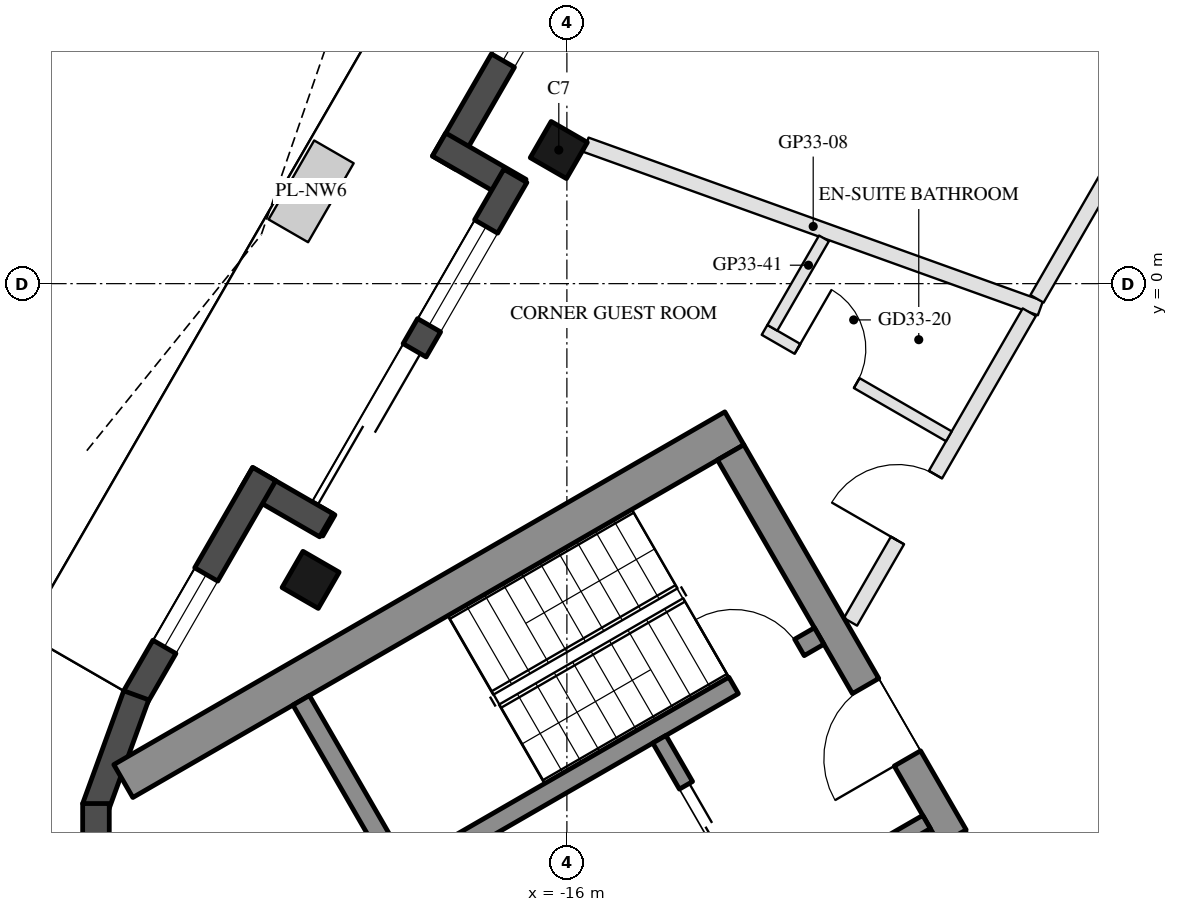
"""IFC4 building model, lengths in metres.
Left out: names, types, materials, properties, quantities, classifications, styles, units other than length and angle.
Written with IfcOpenShell. Run it as: python <this file> out.ifc"""

import sys

from ifc_helpers import new_model, si_unit, direction, frame, frame_2d, origin, origin_2d, place, context, subcontext, project, spatial, rectangle, hollow_rectangle, extrude, boolean, halfspace, element, fill, save


model = new_model("IFC4")
c1 = context("Model", 3, precision=1e-05, world=origin(), true_north=direction((0.0, 1.0)))
c2 = subcontext(c1, "Body", "Model", "MODEL_VIEW")
j1 = project(units=[si_unit("LENGTHUNIT", "METRE"), si_unit("PLANEANGLEUNIT", "RADIAN")], contexts=[c1])
p1 = place(None, origin())
s1 = spatial("IfcSite", under=j1, at=p1, CompositionType="ELEMENT")
p2 = place(p1, origin())
s2 = spatial("IfcBuilding", under=s1, at=p2, CompositionType="ELEMENT")
p3 = place(p2, frame((0.0, 0.0, 313.3)))
s3 = spatial("IfcBuildingStorey", under=s2, at=p3, CompositionType="ELEMENT", Elevation=313.3)
p4 = place(p3, frame((-16.106, 1.758, 0.0), z_axis=(0.0, 0.0, 1.0), x_axis=(0.5, 0.866025403784, 0.0)))
e1 = element("IfcColumn", 1, at=p4, inside=s3, PredefinedType="COLUMN", context=c2, shape_type="SweptSolid", body=[
    boolean("DIFFERENCE", extrude(hollow_rectangle(XDim=0.55, YDim=0.55, WallThickness=0.025, at=origin_2d()), origin(), (0.0, 0.0, 1.0), 3.7), halfspace(frame((0.0, 0.0, 0.034), z_axis=(0.0, 0.0, 1.0), x_axis=(1.0, 0.0, 0.0)), True)),
])
p5 = place(p3, frame((-19.372, -3.898, 0.0), z_axis=(0.0, 0.0, 1.0), x_axis=(0.5, 0.866025403784, 0.0)))
e2 = element("IfcColumn", 2, at=p5, inside=s3, PredefinedType="COLUMN", context=c2, shape_type="SweptSolid", body=[
    boolean("DIFFERENCE", extrude(hollow_rectangle(XDim=0.55, YDim=0.55, WallThickness=0.025, at=origin_2d()), origin(), (0.0, 0.0, 1.0), 3.7), halfspace(frame((0.0, 0.0, 0.04), z_axis=(0.0, 0.0, 1.0), x_axis=(1.0, 0.0, 0.0)), True)),
])
p6 = place(p3, frame((-13.452, 8.806, 0.0), z_axis=(0.0, 0.0, 1.0), x_axis=(-0.499993893925, -0.8660289291, 0.0)))
e3 = element("IfcWall", 3, at=p6, inside=s3, PredefinedType="SOLIDWALL", context=c2, shape_type="SweptSolid", body=[
    extrude(rectangle(XDim=8.331, YDim=0.35, at=frame_2d((4.165, 0.0))), origin(), (0.0, 0.0, 1.0), 3.55),
])
p7 = place(p6, frame((1.525, 0.0, 0.0)))
e4 = element("IfcOpeningElement", 4, at=p7, cuts=e3, PredefinedType="OPENING", context=c2, shape_type="SweptSolid", body=[
    extrude(rectangle(XDim=2.4, YDim=2.4, at=frame_2d((1.2, 1.2))), frame((0.0, 0.185, 0.0), z_axis=(0.0, -1.0, 0.0), x_axis=(1.0, 0.0, 0.0)), (0.0, 0.0, 1.0), 0.37),
])
p8 = place(p6, frame((4.225, 0.0, 0.3)))
e5 = element("IfcOpeningElement", 5, at=p8, cuts=e3, PredefinedType="OPENING", context=c2, shape_type="SweptSolid", body=[
    extrude(rectangle(XDim=0.8, YDim=2.65, at=frame_2d((0.4, 1.325))), frame((0.0, 0.185, 0.0), z_axis=(0.0, -1.0, 0.0), x_axis=(1.0, 0.0, 0.0)), (0.0, 0.0, 1.0), 0.37),
])
p9 = place(p6, frame((5.779, 0.0, 0.3)))
e6 = element("IfcOpeningElement", 6, at=p9, cuts=e3, PredefinedType="OPENING", context=c2, shape_type="SweptSolid", body=[
    extrude(rectangle(XDim=1.0, YDim=2.65, at=frame_2d((0.5, 1.325))), frame((0.0, 0.185, 0.0), z_axis=(0.0, -1.0, 0.0), x_axis=(1.0, 0.0, 0.0)), (0.0, 0.0, 1.0), 0.37),
])
p10 = place(p3, frame((-17.681, 1.83, 0.0), z_axis=(0.0, 0.0, 1.0), x_axis=(0.866092288191, -0.499884134912, 0.0)))
e7 = element("IfcWall", 7, at=p10, inside=s3, PredefinedType="SOLIDWALL", context=c2, shape_type="SweptSolid", body=[
    extrude(rectangle(XDim=1.22, YDim=0.35, at=frame_2d((0.61, 0.0))), origin(), (0.0, 0.0, 1.0), 3.55),
])
p11 = place(p3, frame((-16.678, 1.418, 0.0), z_axis=(0.0, 0.0, 1.0), x_axis=(-0.499996591357, -0.866027371756, 0.0)))
e8 = element("IfcWall", 8, at=p11, inside=s3, PredefinedType="SOLIDWALL", context=c2, shape_type="SweptSolid", body=[
    extrude(rectangle(XDim=5.371, YDim=0.35, at=frame_2d((2.685, 0.0))), origin(), (0.0, 0.0, 1.0), 3.55),
])
p12 = place(p11, frame((2.651, 0.0, 0.0)))
e9 = element("IfcOpeningElement", 9, at=p12, cuts=e8, PredefinedType="OPENING", context=c2, shape_type="SweptSolid", body=[
    extrude(rectangle(XDim=2.4, YDim=2.4, at=frame_2d((1.2, 1.2))), frame((0.0, 0.185, 0.0), z_axis=(0.0, -1.0, 0.0), x_axis=(1.0, 0.0, 0.0)), (0.0, 0.0, 1.0), 0.37),
])
p13 = place(p11, frame((0.77, 0.0, 0.3)))
e10 = element("IfcOpeningElement", 10, at=p13, cuts=e8, PredefinedType="OPENING", context=c2, shape_type="SweptSolid", body=[
    extrude(rectangle(XDim=1.5, YDim=2.65, at=frame_2d((0.75, 1.325))), frame((0.0, 0.185, 0.0), z_axis=(0.0, -1.0, 0.0), x_axis=(1.0, 0.0, 0.0)), (0.0, 0.0, 1.0), 0.37),
])
p14 = place(p3, frame((-19.165, -3.18, 0.0), z_axis=(0.0, 0.0, 1.0), x_axis=(-0.866005645448, 0.500034220881, 0.0)))
e11 = element("IfcWall", 11, at=p14, inside=s3, PredefinedType="SOLIDWALL", context=c2, shape_type="SweptSolid", body=[
    extrude(rectangle(XDim=1.22, YDim=0.35, at=frame_2d((0.61, 0.0))), origin(), (0.0, 0.0, 1.0), 3.55),
])
p15 = place(p3, frame((-19.982, -2.506, 0.0), z_axis=(0.0, 0.0, 1.0), x_axis=(-0.500054617923, -0.865993867816, 0.0)))
e12 = element("IfcWall", 12, at=p15, inside=s3, PredefinedType="SOLIDWALL", context=c2, shape_type="SweptSolid", body=[
    extrude(rectangle(XDim=3.393, YDim=0.35, at=frame_2d((1.697, 0.0))), origin(), (0.0, 0.0, 1.0), 3.55),
])
p16 = place(p15, frame((1.525, 0.0, 0.3)))
e13 = element("IfcOpeningElement", 13, at=p16, cuts=e12, PredefinedType="OPENING", context=c2, shape_type="SweptSolid", body=[
    extrude(rectangle(XDim=1.1, YDim=2.65, at=frame_2d((0.55, 1.325))), frame((0.0, 0.185, 0.0), z_axis=(0.0, -1.0, 0.0), x_axis=(1.0, 0.0, 0.0)), (0.0, 0.0, 1.0), 0.37),
])
for number, where, z_axis, x_axis in (
    (14, (-21.666, -5.417, 0.0), (0.0, 0.0, 1.0), (-0.342, -0.94, 0.0)),
    (15, (-22.196, -6.841, 0.0), (0.0, 0.0, 1.0), (0.0, -1.0, 0.0)),
):
    element("IfcWall", number, at=place(p3, frame(where, z_axis=z_axis, x_axis=x_axis)), inside=s3, PredefinedType="SOLIDWALL", context=c2, shape_type="SweptSolid", body=[
        extrude(rectangle(XDim=1.579, YDim=0.35, at=frame_2d((0.79, 0.0))), origin(), (0.0, 0.0, 1.0), 3.55),
    ])
p17 = place(p3, frame((-13.797, -1.903, 0.0), z_axis=(0.0, 0.0, 1.0), x_axis=(-0.866025286072, -0.500000203884, 0.0)))
e16 = element("IfcWall", 16, at=p17, inside=s3, PredefinedType="SHEAR", context=c2, shape_type="SweptSolid", body=[
    extrude(rectangle(XDim=9.283, YDim=0.5, at=frame_2d((4.641, 0.0))), origin(), (0.0, 0.0, 1.0), 3.5),
])
p18 = place(p3, frame((-13.845, -2.22, 0.0), z_axis=(0.0, 0.0, 1.0), x_axis=(0.500004234368, -0.866022959057, 0.0)))
e17 = element("IfcWall", 17, at=p18, inside=s3, PredefinedType="SHEAR", context=c2, shape_type="SweptSolid", body=[
    extrude(rectangle(XDim=10.0, YDim=0.4, at=frame_2d((5.0, 0.0))), origin(), (0.0, 0.0, 1.0), 3.5),
])
p19 = place(p18, frame((3.55, 0.0, 0.0)))
e18 = element("IfcOpeningElement", 18, at=p19, cuts=e17, PredefinedType="OPENING", context=c2, shape_type="SweptSolid", body=[
    extrude(rectangle(XDim=1.1, YDim=2.1, at=frame_2d((0.55, 1.05))), frame((0.0, 0.21, 0.0), z_axis=(0.0, -1.0, 0.0), x_axis=(1.0, 0.0, 0.0)), (0.0, 0.0, 1.0), 0.42),
])
p20 = place(p18, frame((5.85, 0.0, 0.0)))
e19 = element("IfcOpeningElement", 19, at=p20, cuts=e17, PredefinedType="OPENING", context=c2, shape_type="SweptSolid", body=[
    extrude(rectangle(XDim=1.4, YDim=2.1, at=frame_2d((0.7, 1.05))), frame((0.0, 0.21, 0.0), z_axis=(0.0, -1.0, 0.0), x_axis=(1.0, 0.0, 0.0)), (0.0, 0.0, 1.0), 0.42),
])
p21 = place(p3, frame((-12.681, -4.636, 0.0), z_axis=(0.0, 0.0, 1.0), x_axis=(-0.866021702275, -0.500006411147, 0.0)))
e20 = element("IfcWall", 20, at=p21, inside=s3, PredefinedType="SHEAR", context=c2, shape_type="SweptSolid", body=[
    extrude(rectangle(XDim=6.45, YDim=0.25, at=frame_2d((3.225, 0.0))), origin(), (0.0, 0.0, 1.0), 3.5),
])
p22 = place(p21, frame((0.3, 0.0, 0.0)))
e21 = element("IfcOpeningElement", 21, at=p22, cuts=e20, PredefinedType="OPENING", context=c2, shape_type="SweptSolid", body=[
    extrude(rectangle(XDim=1.0, YDim=2.1, at=frame_2d((0.5, 1.05))), frame((0.0, 0.135, 0.0), z_axis=(0.0, -1.0, 0.0), x_axis=(1.0, 0.0, 0.0)), (0.0, 0.0, 1.0), 0.27),
])
p23 = place(p3, frame((-19.496, -5.482, 0.0), z_axis=(0.0, 0.0, 1.0), x_axis=(0.499990435942, -0.866030925526, 0.0)))
e22 = element("IfcWall", 22, at=p23, inside=s3, PredefinedType="SHEAR", context=c2, shape_type="SweptSolid", body=[
    extrude(rectangle(XDim=2.55, YDim=0.25, at=frame_2d((1.275, 0.0))), origin(), (0.0, 0.0, 1.0), 3.5),
])
p24 = place(p3, frame((-14.783, -5.995, 0.0), z_axis=(0.0, 0.0, 1.0), x_axis=(0.49994636267, -0.866056369097, 0.0)))
e23 = element("IfcWall", 23, at=p24, inside=s3, PredefinedType="SHEAR", context=c2, shape_type="SweptSolid", body=[
    extrude(rectangle(XDim=2.8, YDim=0.2, at=frame_2d((1.4, 0.0))), origin(), (0.0, 0.0, 1.0), 3.5),
])
p25 = place(p24, frame((0.7, 0.0, 0.0)))
e24 = element("IfcOpeningElement", 24, at=p25, cuts=e23, PredefinedType="OPENING", context=c2, shape_type="SweptSolid", body=[
    extrude(rectangle(XDim=1.2, YDim=2.1, at=frame_2d((0.6, 1.05))), frame((0.0, 0.11, 0.0), z_axis=(0.0, -1.0, 0.0), x_axis=(1.0, 0.0, 0.0)), (0.0, 0.0, 1.0), 0.22),
])
p26 = place(p3, frame((-11.268, -7.083, 0.0), z_axis=(0.0, 0.0, 1.0), x_axis=(-0.866050077142, -0.499957262057, 0.0)))
e25 = element("IfcWall", 25, at=p26, inside=s3, PredefinedType="SHEAR", context=c2, shape_type="SweptSolid", body=[
    extrude(rectangle(XDim=2.4, YDim=0.2, at=frame_2d((1.2, 0.0))), origin(), (0.0, 0.0, 1.0), 3.5),
])
p27 = place(p3, frame((-15.749, 1.827, 0.0), z_axis=(0.0, 0.0, 1.0), x_axis=(0.941030372408, -0.3383220924, 0.0)))
e26 = element("IfcWall", 26, at=p27, inside=s3, PredefinedType="PARTITIONING", context=c2, shape_type="SweptSolid", body=[
    extrude(rectangle(XDim=6.353, YDim=0.2, at=frame_2d((3.177, 0.0))), origin(), (0.0, 0.0, 1.0), 3.55),
])
p28 = place(p3, frame((-9.815, -0.2, 0.0), z_axis=(0.0, 0.0, 1.0), x_axis=(0.499995091154, 0.866028237889, 0.0)))
e27 = element("IfcWall", 27, at=p28, inside=s3, PredefinedType="PARTITIONING", context=c2, shape_type="SweptSolid", body=[
    extrude(rectangle(XDim=10.18, YDim=0.2, at=frame_2d((5.09, 0.0))), origin(), (0.0, 0.0, 1.0), 3.1),
])
p29 = place(p28, frame((6.73, 0.0, 0.0)))
e28 = element("IfcOpeningElement", 28, at=p29, cuts=e27, PredefinedType="OPENING", context=c2, shape_type="SweptSolid", body=[
    extrude(rectangle(XDim=1.0, YDim=2.1, at=frame_2d((0.5, 1.05))), frame((0.0, 0.11, 0.0), z_axis=(0.0, -1.0, 0.0), x_axis=(1.0, 0.0, 0.0)), (0.0, 0.0, 1.0), 0.22),
])
p30 = place(p3, frame((-12.269, -4.45, 0.0), z_axis=(0.0, 0.0, 1.0), x_axis=(0.500006955494, 0.866021387991, 0.0)))
e29 = element("IfcWall", 29, at=p30, inside=s3, PredefinedType="PARTITIONING", context=c2, shape_type="SweptSolid", body=[
    extrude(rectangle(XDim=4.705, YDim=0.2, at=frame_2d((2.352, 0.0))), origin(), (0.0, 0.0, 1.0), 3.1),
])
p31 = place(p30, frame((1.237, 0.0, 0.0)))
e30 = element("IfcOpeningElement", 30, at=p31, cuts=e29, PredefinedType="OPENING", context=c2, shape_type="SweptSolid", body=[
    extrude(rectangle(XDim=1.0, YDim=2.1, at=frame_2d((0.5, 1.05))), frame((0.0, 0.11, 0.0), z_axis=(0.0, -1.0, 0.0), x_axis=(1.0, 0.0, 0.0)), (0.0, 0.0, 1.0), 0.22),
])
p32 = place(p3, frame((-13.399, -0.608, 0.0), z_axis=(0.0, 0.0, 1.0), x_axis=(0.866034573852, -0.49998411664, 0.0)))
e31 = element("IfcWall", 31, at=p32, inside=s3, PredefinedType="PARTITIONING", context=c2, shape_type="SweptSolid", body=[
    extrude(rectangle(XDim=2.8, YDim=0.15, at=frame_2d((1.4, 0.0))), origin(), (0.0, 0.0, 1.0), 3.55),
])
p33 = place(p32, frame((0.5, 0.0, 0.0)))
e32 = element("IfcOpeningElement", 32, at=p33, cuts=e31, PredefinedType="OPENING", context=c2, shape_type="SweptSolid", body=[
    extrude(rectangle(XDim=0.9, YDim=2.1, at=frame_2d((0.45, 1.05))), frame((0.0, 0.085, 0.0), z_axis=(0.0, -1.0, 0.0), x_axis=(1.0, 0.0, 0.0)), (0.0, 0.0, 1.0), 0.17),
])
p34 = place(p3, frame((-12.618, 0.595, 0.0), z_axis=(0.0, 0.0, 1.0), x_axis=(-0.499966175448, -0.866044931518, 0.0)))
e33 = element("IfcWall", 33, at=p34, inside=s3, PredefinedType="PARTITIONING", context=c2, shape_type="SweptSolid", body=[
    extrude(rectangle(XDim=1.358, YDim=0.15, at=frame_2d((0.679, 0.0))), origin(), (0.0, 0.0, 1.0), 3.1),
])
p35 = place(p9, origin())
e34 = element("IfcWindow", 34, at=p35, inside=s3, PartitioningType="SINGLE_PANEL", PredefinedType="WINDOW", context=c2, shape_type="SweptSolid", body=[
    extrude(rectangle(XDim=1.0, YDim=2.65, at=frame_2d((0.5, 1.325))), frame((0.0, 0.03, 0.0), z_axis=(0.0, -1.0, 0.0), x_axis=(1.0, 0.0, 0.0)), (0.0, 0.0, 1.0), 0.06),
])
fill(e6, e34)
p36 = place(p12, frame((2.4, 0.0, 0.0), z_axis=(0.0, 0.0, 1.0), x_axis=(-1.0, 0.0, 0.0)))
e35 = element("IfcDoor", 35, at=p36, inside=s3, OperationType="SLIDING_TO_LEFT", PredefinedType="DOOR", context=c2, shape_type="SweptSolid", body=[
    extrude(rectangle(XDim=2.4, YDim=2.4, at=frame_2d((1.2, 1.2))), frame((0.0, 0.025, 0.0), z_axis=(0.0, -1.0, 0.0), x_axis=(1.0, 0.0, 0.0)), (0.0, 0.0, 1.0), 0.05),
])
fill(e9, e35)
p37 = place(p13, origin())
e36 = element("IfcWindow", 36, at=p37, inside=s3, PartitioningType="SINGLE_PANEL", PredefinedType="WINDOW", context=c2, shape_type="SweptSolid", body=[
    extrude(rectangle(XDim=1.5, YDim=2.65, at=frame_2d((0.75, 1.325))), frame((0.0, 0.03, 0.0), z_axis=(0.0, -1.0, 0.0), x_axis=(1.0, 0.0, 0.0)), (0.0, 0.0, 1.0), 0.06),
])
fill(e10, e36)
p38 = place(p16, origin())
e37 = element("IfcWindow", 37, at=p38, inside=s3, PartitioningType="SINGLE_PANEL", PredefinedType="WINDOW", context=c2, shape_type="SweptSolid", body=[
    extrude(rectangle(XDim=1.1, YDim=2.65, at=frame_2d((0.55, 1.325))), frame((0.0, 0.03, 0.0), z_axis=(0.0, -1.0, 0.0), x_axis=(1.0, 0.0, 0.0)), (0.0, 0.0, 1.0), 0.06),
])
fill(e13, e37)
p39 = place(p25, origin())
e38 = element("IfcDoor", 38, at=p39, inside=s3, OperationType="DOUBLE_DOOR_SLIDING", PredefinedType="DOOR", context=c2, shape_type="SweptSolid", body=[
    extrude(rectangle(XDim=1.2, YDim=2.1, at=frame_2d((0.6, 1.05))), frame((0.0, 0.025, 0.0), z_axis=(0.0, -1.0, 0.0), x_axis=(1.0, 0.0, 0.0)), (0.0, 0.0, 1.0), 0.05),
])
fill(e24, e38)
p40 = place(p19, frame((1.1, 0.0, 0.0), z_axis=(0.0, 0.0, 1.0), x_axis=(-1.0, 0.0, 0.0)))
e39 = element("IfcDoor", 39, at=p40, inside=s3, OperationType="SINGLE_SWING_LEFT", PredefinedType="DOOR", context=c2, shape_type="SweptSolid", body=[
    extrude(rectangle(XDim=1.1, YDim=2.1, at=frame_2d((0.55, 1.05))), frame((0.0, 0.025, 0.0), z_axis=(0.0, -1.0, 0.0), x_axis=(1.0, 0.0, 0.0)), (0.0, 0.0, 1.0), 0.05),
])
fill(e18, e39)
p41 = place(p22, frame((1.0, 0.0, 0.0), z_axis=(0.0, 0.0, 1.0), x_axis=(-1.0, 0.0, 0.0)))
e40 = element("IfcDoor", 40, at=p41, inside=s3, OperationType="SINGLE_SWING_LEFT", PredefinedType="DOOR", context=c2, shape_type="SweptSolid", body=[
    extrude(rectangle(XDim=1.0, YDim=2.1, at=frame_2d((0.5, 1.05))), frame((0.0, 0.025, 0.0), z_axis=(0.0, -1.0, 0.0), x_axis=(1.0, 0.0, 0.0)), (0.0, 0.0, 1.0), 0.05),
])
fill(e21, e40)
p42 = place(p33, origin())
e41 = element("IfcDoor", 41, at=p42, inside=s3, OperationType="SINGLE_SWING_LEFT", PredefinedType="DOOR", context=c2, shape_type="SweptSolid", body=[
    extrude(rectangle(XDim=0.9, YDim=2.1, at=frame_2d((0.45, 1.05))), frame((0.0, 0.025, 0.0), z_axis=(0.0, -1.0, 0.0), x_axis=(1.0, 0.0, 0.0)), (0.0, 0.0, 1.0), 0.05),
])
fill(e32, e41)
p43 = place(p31, origin())
e42 = element("IfcDoor", 42, at=p43, inside=s3, OperationType="SINGLE_SWING_LEFT", PredefinedType="DOOR", context=c2, shape_type="SweptSolid", body=[
    extrude(rectangle(XDim=1.0, YDim=2.1, at=frame_2d((0.5, 1.05))), frame((0.0, 0.025, 0.0), z_axis=(0.0, -1.0, 0.0), x_axis=(1.0, 0.0, 0.0)), (0.0, 0.0, 1.0), 0.05),
])
fill(e30, e42)
save(model, sys.argv[1])
